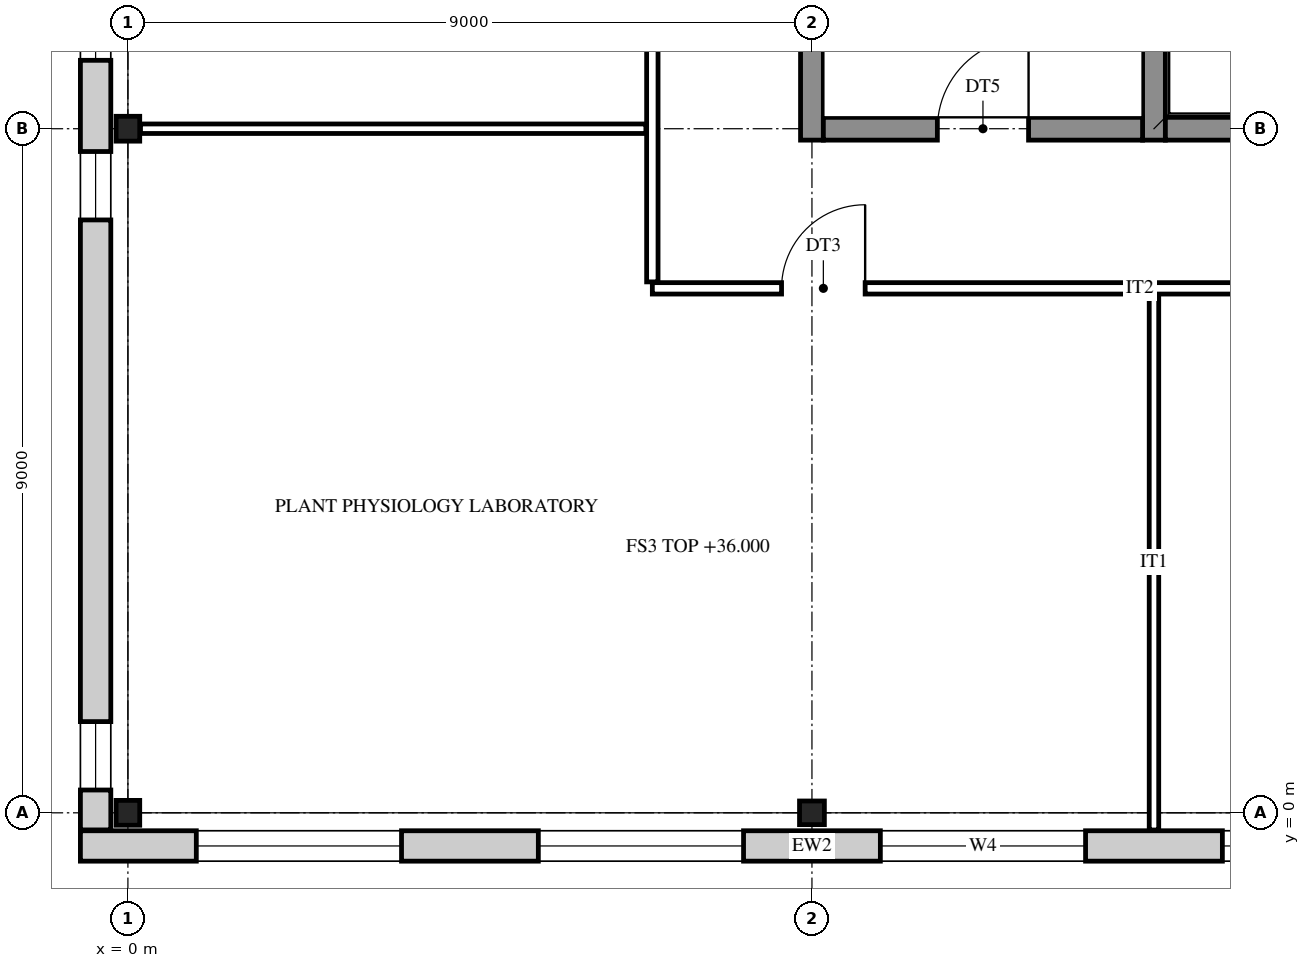
"""IFC4 building model, lengths in metres.
Left out: names, types, materials, properties, quantities, classifications, styles, units other than length and angle.
Written with IfcOpenShell. Run it as: python <this file> out.ifc"""

import sys

from ifc_helpers import new_model, si_unit, direction, frame, frame_2d, origin, origin_2d, place, context, subcontext, project, spatial, rectangle, i_section, extrude, element, fill, save


model = new_model("IFC4")
c1 = context("Model", 3, precision=1e-05, world=origin(), true_north=direction((0.0, 1.0)))
c2 = subcontext(c1, "Body", "Model", "MODEL_VIEW")
j1 = project(units=[si_unit("LENGTHUNIT", "METRE"), si_unit("PLANEANGLEUNIT", "RADIAN")], contexts=[c1])
p1 = place(None, origin())
s1 = spatial("IfcSite", under=j1, at=p1, CompositionType="ELEMENT")
p2 = place(p1, origin())
s2 = spatial("IfcBuilding", under=s1, at=p2, CompositionType="ELEMENT")
p3 = place(p2, frame((0.0, 0.0, 36.0)))
s3 = spatial("IfcBuildingStorey", under=s2, at=p3, CompositionType="ELEMENT", Elevation=36.0)
for number, where, z_axis, x_axis in (
    (1, (0.0, 0.0, 0.0), (0.0, 0.0, 1.0), (1.0, 0.0, 0.0)),
    (2, (0.0, 9.0, 0.0), (0.0, 0.0, 1.0), (1.0, 0.0, 0.0)),
    (3, (9.0, 0.0, 0.0), (0.0, 0.0, 1.0), (0.0, 1.0, 0.0)),
):
    element("IfcColumn", number, at=place(p3, frame(where, z_axis=z_axis, x_axis=x_axis)), inside=s3, PredefinedType="COLUMN", context=c2, shape_type="SweptSolid", body=[
        extrude(i_section(OverallWidth=0.311, OverallDepth=0.327, WebThickness=0.016, FlangeThickness=0.025, FilletRadius=0.017, at=origin_2d()), origin(), (0.0, 0.0, 1.0), 4.2),
    ])
for number, where, z_axis, x_axis in (
    (4, (9.0, 8.85, 0.0), (0.0, 0.0, 1.0), (0.0, 1.0, 0.0)),
    (5, (13.5, 8.85, 0.0), (0.0, 0.0, 1.0), (0.0, 1.0, 0.0)),
):
    element("IfcWall", number, at=place(p3, frame(where, z_axis=z_axis, x_axis=x_axis)), inside=s3, PredefinedType="SHEAR", context=c2, shape_type="SweptSolid", body=[
        extrude(rectangle(XDim=9.3, YDim=0.3, at=frame_2d((4.65, 0.0))), origin(), (0.0, 0.0, 1.0), 4.2),
    ])
p4 = place(p3, frame((9.15, 9.0, 0.0), z_axis=(0.0, 0.0, 1.0), x_axis=(1.0, 0.0, 0.0)))
e6 = element("IfcWall", 6, at=p4, inside=s3, PredefinedType="SHEAR", context=c2, shape_type="SweptSolid", body=[
    extrude(rectangle(XDim=4.2, YDim=0.3, at=frame_2d((2.1, 0.0))), origin(), (0.0, 0.0, 1.0), 4.2),
])
p5 = place(p4, frame((1.5, 0.0, 0.0)))
e7 = element("IfcOpeningElement", 7, at=p5, cuts=e6, PredefinedType="OPENING", context=c2, shape_type="SweptSolid", body=[
    extrude(rectangle(XDim=1.2, YDim=2.1, at=frame_2d((0.6, 1.05))), frame((0.0, 0.16, 0.0), z_axis=(0.0, -1.0, 0.0), x_axis=(1.0, 0.0, 0.0)), (0.0, 0.0, 1.0), 0.32),
])
p6 = place(p3, frame((13.65, 9.0, 0.0), z_axis=(0.0, 0.0, 1.0), x_axis=(1.0, 0.0, 0.0)))
e8 = element("IfcWall", 8, at=p6, inside=s3, PredefinedType="SHEAR", context=c2, shape_type="SweptSolid", body=[
    extrude(rectangle(XDim=2.7, YDim=0.3, at=frame_2d((1.35, 0.0))), origin(), (0.0, 0.0, 1.0), 4.2),
])
p7 = place(p3, frame((32.125, -0.436, 0.0), z_axis=(0.0, 0.0, 1.0), x_axis=(-1.0, 0.0, 0.0)))
e9 = element("IfcWall", 9, at=p7, inside=s3, PredefinedType="STANDARD", context=c2, shape_type="SweptSolid", body=[
    extrude(rectangle(XDim=32.75, YDim=0.4, at=frame_2d((16.375, 0.0))), origin(), (0.0, 0.0, 1.0), 4.2),
])
p8 = place(p7, frame((28.525, 0.0, 0.9)))
e10 = element("IfcOpeningElement", 10, at=p8, cuts=e9, PredefinedType="OPENING", context=c2, shape_type="SweptSolid", body=[
    extrude(rectangle(XDim=2.7, YDim=2.5, at=frame_2d((1.35, 1.25))), frame((0.0, 0.21, 0.0), z_axis=(0.0, -1.0, 0.0), x_axis=(1.0, 0.0, 0.0)), (0.0, 0.0, 1.0), 0.42),
])
p9 = place(p7, frame((24.025, 0.0, 0.9)))
e11 = element("IfcOpeningElement", 11, at=p9, cuts=e9, PredefinedType="OPENING", context=c2, shape_type="SweptSolid", body=[
    extrude(rectangle(XDim=2.7, YDim=2.5, at=frame_2d((1.35, 1.25))), frame((0.0, 0.21, 0.0), z_axis=(0.0, -1.0, 0.0), x_axis=(1.0, 0.0, 0.0)), (0.0, 0.0, 1.0), 0.42),
])
p10 = place(p7, frame((19.525, 0.0, 0.9)))
e12 = element("IfcOpeningElement", 12, at=p10, cuts=e9, PredefinedType="OPENING", context=c2, shape_type="SweptSolid", body=[
    extrude(rectangle(XDim=2.7, YDim=2.5, at=frame_2d((1.35, 1.25))), frame((0.0, 0.21, 0.0), z_axis=(0.0, -1.0, 0.0), x_axis=(1.0, 0.0, 0.0)), (0.0, 0.0, 1.0), 0.42),
])
p11 = place(p7, frame((15.025, 0.0, 0.9)))
e13 = element("IfcOpeningElement", 13, at=p11, cuts=e9, PredefinedType="OPENING", context=c2, shape_type="SweptSolid", body=[
    extrude(rectangle(XDim=2.7, YDim=2.5, at=frame_2d((1.35, 1.25))), frame((0.0, 0.21, 0.0), z_axis=(0.0, -1.0, 0.0), x_axis=(1.0, 0.0, 0.0)), (0.0, 0.0, 1.0), 0.42),
])
p12 = place(p7, frame((10.525, 0.0, 0.9)))
e14 = element("IfcOpeningElement", 14, at=p12, cuts=e9, PredefinedType="OPENING", context=c2, shape_type="SweptSolid", body=[
    extrude(rectangle(XDim=2.7, YDim=2.5, at=frame_2d((1.35, 1.25))), frame((0.0, 0.21, 0.0), z_axis=(0.0, -1.0, 0.0), x_axis=(1.0, 0.0, 0.0)), (0.0, 0.0, 1.0), 0.42),
])
p13 = place(p7, frame((6.025, 0.0, 0.9)))
e15 = element("IfcOpeningElement", 15, at=p13, cuts=e9, PredefinedType="OPENING", context=c2, shape_type="SweptSolid", body=[
    extrude(rectangle(XDim=2.7, YDim=2.5, at=frame_2d((1.35, 1.25))), frame((0.0, 0.21, 0.0), z_axis=(0.0, -1.0, 0.0), x_axis=(1.0, 0.0, 0.0)), (0.0, 0.0, 1.0), 0.42),
])
p14 = place(p7, frame((1.525, 0.0, 0.9)))
e16 = element("IfcOpeningElement", 16, at=p14, cuts=e9, PredefinedType="OPENING", context=c2, shape_type="SweptSolid", body=[
    extrude(rectangle(XDim=2.7, YDim=2.5, at=frame_2d((1.35, 1.25))), frame((0.0, 0.21, 0.0), z_axis=(0.0, -1.0, 0.0), x_axis=(1.0, 0.0, 0.0)), (0.0, 0.0, 1.0), 0.42),
])
p15 = place(p3, frame((-0.425, -0.225, 0.0), z_axis=(0.0, 0.0, 1.0), x_axis=(0.0, 1.0, 0.0)))
e17 = element("IfcWall", 17, at=p15, inside=s3, PredefinedType="STANDARD", context=c2, shape_type="SweptSolid", body=[
    extrude(rectangle(XDim=27.45, YDim=0.4, at=frame_2d((13.725, 0.0))), origin(), (0.0, 0.0, 1.0), 4.2),
])
p16 = place(p15, frame((0.525, 0.0, 0.9)))
e18 = element("IfcOpeningElement", 18, at=p16, cuts=e17, PredefinedType="OPENING", context=c2, shape_type="SweptSolid", body=[
    extrude(rectangle(XDim=0.9, YDim=2.0, at=frame_2d((0.45, 1.0))), frame((0.0, 0.21, 0.0), z_axis=(0.0, -1.0, 0.0), x_axis=(1.0, 0.0, 0.0)), (0.0, 0.0, 1.0), 0.42),
])
p17 = place(p15, frame((8.025, 0.0, 0.9)))
e19 = element("IfcOpeningElement", 19, at=p17, cuts=e17, PredefinedType="OPENING", context=c2, shape_type="SweptSolid", body=[
    extrude(rectangle(XDim=0.9, YDim=2.0, at=frame_2d((0.45, 1.0))), frame((0.0, 0.21, 0.0), z_axis=(0.0, -1.0, 0.0), x_axis=(1.0, 0.0, 0.0)), (0.0, 0.0, 1.0), 0.42),
])
p18 = place(p15, frame((10.125, 0.0, 0.9)))
e20 = element("IfcOpeningElement", 20, at=p18, cuts=e17, PredefinedType="OPENING", context=c2, shape_type="SweptSolid", body=[
    extrude(rectangle(XDim=2.7, YDim=2.5, at=frame_2d((1.35, 1.25))), frame((0.0, 0.21, 0.0), z_axis=(0.0, -1.0, 0.0), x_axis=(1.0, 0.0, 0.0)), (0.0, 0.0, 1.0), 0.42),
])
p19 = place(p15, frame((14.625, 0.0, 0.9)))
e21 = element("IfcOpeningElement", 21, at=p19, cuts=e17, PredefinedType="OPENING", context=c2, shape_type="SweptSolid", body=[
    extrude(rectangle(XDim=2.7, YDim=2.5, at=frame_2d((1.35, 1.25))), frame((0.0, 0.21, 0.0), z_axis=(0.0, -1.0, 0.0), x_axis=(1.0, 0.0, 0.0)), (0.0, 0.0, 1.0), 0.42),
])
p20 = place(p15, frame((18.525, 0.0, 0.9)))
e22 = element("IfcOpeningElement", 22, at=p20, cuts=e17, PredefinedType="OPENING", context=c2, shape_type="SweptSolid", body=[
    extrude(rectangle(XDim=0.9, YDim=2.0, at=frame_2d((0.45, 1.0))), frame((0.0, 0.21, 0.0), z_axis=(0.0, -1.0, 0.0), x_axis=(1.0, 0.0, 0.0)), (0.0, 0.0, 1.0), 0.42),
])
p21 = place(p15, frame((26.025, 0.0, 0.9)))
e23 = element("IfcOpeningElement", 23, at=p21, cuts=e17, PredefinedType="OPENING", context=c2, shape_type="SweptSolid", body=[
    extrude(rectangle(XDim=0.9, YDim=2.0, at=frame_2d((0.45, 1.0))), frame((0.0, 0.21, 0.0), z_axis=(0.0, -1.0, 0.0), x_axis=(1.0, 0.0, 0.0)), (0.0, 0.0, 1.0), 0.42),
])
p22 = place(p3, frame((6.9, 6.985, 0.0), z_axis=(0.0, 0.0, 1.0), x_axis=(0.0, 1.0, 0.0)))
e24 = element("IfcWall", 24, at=p22, inside=s3, PredefinedType="PARTITIONING", context=c2, shape_type="SweptSolid", body=[
    extrude(rectangle(XDim=11.015, YDim=0.15, at=frame_2d((5.507, 0.0))), origin(), (0.0, 0.0, 1.0), 3.537),
])
p23 = place(p22, frame((5.965, 0.0, 0.0)))
e25 = element("IfcOpeningElement", 25, at=p23, cuts=e24, PredefinedType="OPENING", context=c2, shape_type="SweptSolid", body=[
    extrude(rectangle(XDim=1.1, YDim=2.1, at=frame_2d((0.55, 1.05))), frame((0.0, 0.085, 0.0), z_axis=(0.0, -1.0, 0.0), x_axis=(1.0, 0.0, 0.0)), (0.0, 0.0, 1.0), 0.17),
])
p24 = place(p3, frame((13.5, -0.226, 0.0), z_axis=(0.0, 0.0, 1.0), x_axis=(0.0, 1.0, 0.0)))
e26 = element("IfcWall", 26, at=p24, inside=s3, PredefinedType="PARTITIONING", context=c2, shape_type="SweptSolid", body=[
    extrude(rectangle(XDim=7.041, YDim=0.125, at=frame_2d((3.521, 0.0))), origin(), (0.0, 0.0, 1.0), 3.537),
])
p25 = place(p3, frame((6.9, 6.9, 0.0), z_axis=(0.0, 0.0, 1.0), x_axis=(1.0, 0.0, 0.0)))
e27 = element("IfcWall", 27, at=p25, inside=s3, PredefinedType="PARTITIONING", context=c2, shape_type="SweptSolid", body=[
    extrude(rectangle(XDim=20.1, YDim=0.15, at=frame_2d((10.05, 0.0))), origin(), (0.0, 0.0, 1.0), 3.537),
])
p26 = place(p25, frame((1.7, 0.0, 0.0)))
e28 = element("IfcOpeningElement", 28, at=p26, cuts=e27, PredefinedType="OPENING", context=c2, shape_type="SweptSolid", body=[
    extrude(rectangle(XDim=1.1, YDim=2.1, at=frame_2d((0.55, 1.05))), frame((0.0, 0.085, 0.0), z_axis=(0.0, -1.0, 0.0), x_axis=(1.0, 0.0, 0.0)), (0.0, 0.0, 1.0), 0.17),
])
p27 = place(p25, frame((17.975, 0.0, 0.0)))
e29 = element("IfcOpeningElement", 29, at=p27, cuts=e27, PredefinedType="OPENING", context=c2, shape_type="SweptSolid", body=[
    extrude(rectangle(XDim=1.1, YDim=2.1, at=frame_2d((0.55, 1.05))), frame((0.0, 0.085, 0.0), z_axis=(0.0, -1.0, 0.0), x_axis=(1.0, 0.0, 0.0)), (0.0, 0.0, 1.0), 0.17),
])
p28 = place(p25, frame((10.025, 0.0, 0.0)))
e30 = element("IfcOpeningElement", 30, at=p28, cuts=e27, PredefinedType="OPENING", context=c2, shape_type="SweptSolid", body=[
    extrude(rectangle(XDim=1.1, YDim=2.1, at=frame_2d((0.55, 1.05))), frame((0.0, 0.085, 0.0), z_axis=(0.0, -1.0, 0.0), x_axis=(1.0, 0.0, 0.0)), (0.0, 0.0, 1.0), 0.17),
])
p29 = place(p3, frame((0.166, 9.0, 0.0), z_axis=(0.0, 0.0, 1.0), x_axis=(1.0, 0.0, 0.0)))
e31 = element("IfcWall", 31, at=p29, inside=s3, PredefinedType="PARTITIONING", context=c2, shape_type="SweptSolid", body=[
    extrude(rectangle(XDim=6.649, YDim=0.125, at=frame_2d((3.325, 0.0))), origin(), (0.0, 0.0, 1.0), 3.537),
])
p30 = place(p8, origin())
e32 = element("IfcWindow", 32, at=p30, inside=s3, PartitioningType="SINGLE_PANEL", PredefinedType="WINDOW", context=c2, shape_type="SweptSolid", body=[
    extrude(rectangle(XDim=2.7, YDim=2.5, at=frame_2d((1.35, 1.25))), frame((0.0, 0.03, 0.0), z_axis=(0.0, -1.0, 0.0), x_axis=(1.0, 0.0, 0.0)), (0.0, 0.0, 1.0), 0.06),
])
fill(e10, e32)
p31 = place(p9, origin())
e33 = element("IfcWindow", 33, at=p31, inside=s3, PartitioningType="SINGLE_PANEL", PredefinedType="WINDOW", context=c2, shape_type="SweptSolid", body=[
    extrude(rectangle(XDim=2.7, YDim=2.5, at=frame_2d((1.35, 1.25))), frame((0.0, 0.03, 0.0), z_axis=(0.0, -1.0, 0.0), x_axis=(1.0, 0.0, 0.0)), (0.0, 0.0, 1.0), 0.06),
])
fill(e11, e33)
p32 = place(p10, origin())
e34 = element("IfcWindow", 34, at=p32, inside=s3, PartitioningType="SINGLE_PANEL", PredefinedType="WINDOW", context=c2, shape_type="SweptSolid", body=[
    extrude(rectangle(XDim=2.7, YDim=2.5, at=frame_2d((1.35, 1.25))), frame((0.0, 0.03, 0.0), z_axis=(0.0, -1.0, 0.0), x_axis=(1.0, 0.0, 0.0)), (0.0, 0.0, 1.0), 0.06),
])
fill(e12, e34)
p33 = place(p11, origin())
e35 = element("IfcWindow", 35, at=p33, inside=s3, PartitioningType="SINGLE_PANEL", PredefinedType="WINDOW", context=c2, shape_type="SweptSolid", body=[
    extrude(rectangle(XDim=2.7, YDim=2.5, at=frame_2d((1.35, 1.25))), frame((0.0, 0.03, 0.0), z_axis=(0.0, -1.0, 0.0), x_axis=(1.0, 0.0, 0.0)), (0.0, 0.0, 1.0), 0.06),
])
fill(e13, e35)
p34 = place(p16, origin())
e36 = element("IfcWindow", 36, at=p34, inside=s3, PartitioningType="SINGLE_PANEL", PredefinedType="WINDOW", context=c2, shape_type="SweptSolid", body=[
    extrude(rectangle(XDim=0.9, YDim=2.0, at=frame_2d((0.45, 1.0))), frame((0.0, 0.03, 0.0), z_axis=(0.0, -1.0, 0.0), x_axis=(1.0, 0.0, 0.0)), (0.0, 0.0, 1.0), 0.06),
])
fill(e18, e36)
p35 = place(p17, origin())
e37 = element("IfcWindow", 37, at=p35, inside=s3, PartitioningType="SINGLE_PANEL", PredefinedType="WINDOW", context=c2, shape_type="SweptSolid", body=[
    extrude(rectangle(XDim=0.9, YDim=2.0, at=frame_2d((0.45, 1.0))), frame((0.0, 0.03, 0.0), z_axis=(0.0, -1.0, 0.0), x_axis=(1.0, 0.0, 0.0)), (0.0, 0.0, 1.0), 0.06),
])
fill(e19, e37)
p36 = place(p18, origin())
e38 = element("IfcWindow", 38, at=p36, inside=s3, PartitioningType="SINGLE_PANEL", PredefinedType="WINDOW", context=c2, shape_type="SweptSolid", body=[
    extrude(rectangle(XDim=2.7, YDim=2.5, at=frame_2d((1.35, 1.25))), frame((0.0, 0.03, 0.0), z_axis=(0.0, -1.0, 0.0), x_axis=(1.0, 0.0, 0.0)), (0.0, 0.0, 1.0), 0.06),
])
fill(e20, e38)
p37 = place(p5, origin())
e39 = element("IfcDoor", 39, at=p37, inside=s3, OperationType="SINGLE_SWING_RIGHT", PredefinedType="DOOR", context=c2, shape_type="SweptSolid", body=[
    extrude(rectangle(XDim=1.2, YDim=2.1, at=frame_2d((0.6, 1.05))), frame((0.0, 0.025, 0.0), z_axis=(0.0, -1.0, 0.0), x_axis=(1.0, 0.0, 0.0)), (0.0, 0.0, 1.0), 0.05),
])
fill(e7, e39)
p38 = place(p26, frame((1.1, 0.0, 0.0), z_axis=(0.0, 0.0, 1.0), x_axis=(-1.0, 0.0, 0.0)))
e40 = element("IfcDoor", 40, at=p38, inside=s3, OperationType="SINGLE_SWING_RIGHT", PredefinedType="DOOR", context=c2, shape_type="SweptSolid", body=[
    extrude(rectangle(XDim=1.1, YDim=2.1, at=frame_2d((0.55, 1.05))), frame((0.0, 0.025, 0.0), z_axis=(0.0, -1.0, 0.0), x_axis=(1.0, 0.0, 0.0)), (0.0, 0.0, 1.0), 0.05),
])
fill(e28, e40)
save(model, sys.argv[1])
